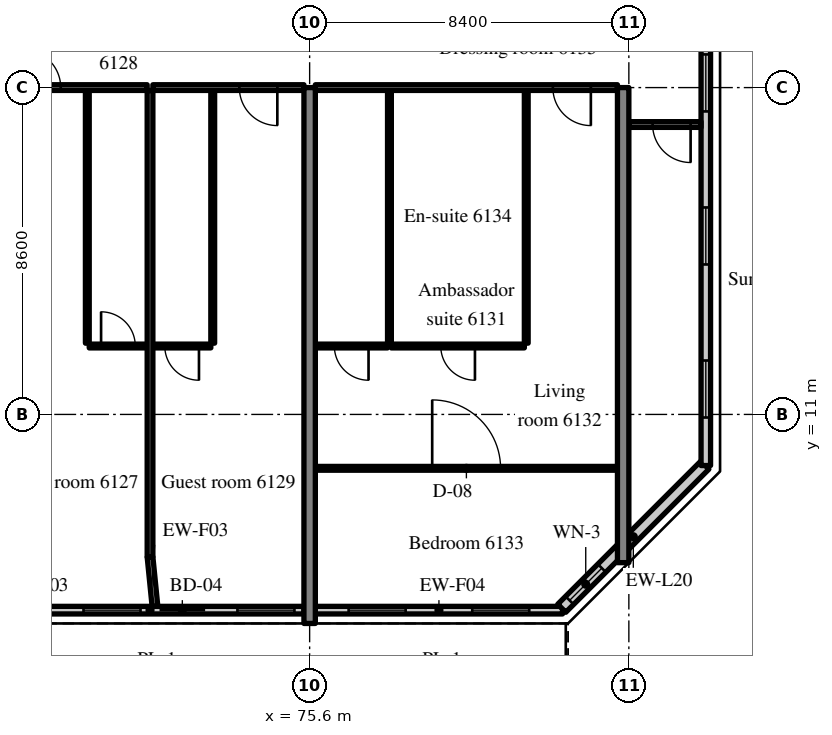
"""IFC4 building model, lengths in metres.
Left out: names, types, materials, properties, quantities, classifications, styles, units other than length and angle.
Written with IfcOpenShell. Run it as: python <this file> out.ifc"""

import sys

from ifc_helpers import new_model, si_unit, direction, frame, frame_2d, origin, place, context, subcontext, project, spatial, rectangle, extrude, source, transform, mapped, element, fill, save


model = new_model("IFC4")
c1 = context("Model", 3, precision=1e-05, world=origin(), true_north=direction((0.0, 1.0)))
c2 = subcontext(c1, "Body", "Model", "MODEL_VIEW")
j1 = project(units=[si_unit("LENGTHUNIT", "METRE"), si_unit("PLANEANGLEUNIT", "RADIAN")], contexts=[c1])
p1 = place(None, origin())
s1 = spatial("IfcSite", under=j1, at=p1, CompositionType="ELEMENT")
p2 = place(p1, origin())
s2 = spatial("IfcBuilding", under=s1, at=p2, CompositionType="ELEMENT")
p3 = place(p2, frame((0.0, 0.0, 253.0)))
s3 = spatial("IfcBuildingStorey", under=s2, at=p3, CompositionType="ELEMENT", Elevation=253.0)
m1 = source(origin(), c2, "Body", "SweptSolid", [
    extrude(rectangle(XDim=14.1, YDim=0.3, at=frame_2d((7.05, 0.0))), origin(), (0.0, 0.0, 1.0), 3.62),
])
p4 = place(p3, frame((75.6, 5.5, 0.0), z_axis=(0.0, 0.0, 1.0), x_axis=(0.0, 1.0, 0.0)))
e1 = element("IfcWall", 1, at=p4, inside=s3, PredefinedType="SHEAR", context=c2, shape_type="MappedRepresentation", body=[
    mapped(m1, transform((0.0, 0.0, 0.0), scale=1.0)),
])
m2 = source(origin(), c2, "Body", "SweptSolid", [
    extrude(rectangle(XDim=12.5, YDim=0.3, at=frame_2d((6.25, 0.0))), origin(), (0.0, 0.0, 1.0), 3.62),
])
p5 = place(p3, frame((83.85, 7.1, 0.0), z_axis=(0.0, 0.0, 1.0), x_axis=(0.0, 1.0, 0.0)))
e2 = element("IfcWall", 2, at=p5, inside=s3, PredefinedType="SHEAR", context=c2, shape_type="MappedRepresentation", body=[
    mapped(m2, transform((0.0, 0.0, 0.0), scale=1.0)),
])
m3 = source(origin(), c2, "Body", "SweptSolid", [
    extrude(rectangle(XDim=8.1, YDim=0.2, at=frame_2d((4.05, 0.0))), origin(), (0.0, 0.0, 1.0), 3.02),
])
p6 = place(p3, frame((67.35, 5.85, 0.0), z_axis=(0.0, 0.0, 1.0), x_axis=(1.0, 0.0, 0.0)))
e3 = element("IfcWall", 3, at=p6, inside=s3, PredefinedType="SOLIDWALL", context=c2, shape_type="MappedRepresentation", body=[
    mapped(m3, transform((0.0, 0.0, 0.0), scale=1.0)),
])
m4 = source(origin(), c2, "Body", "SweptSolid", [
    extrude(rectangle(XDim=1.2, YDim=2.4, at=frame_2d((0.6, 1.2))), frame((0.0, 0.11, 0.0), z_axis=(0.0, -1.0, 0.0), x_axis=(1.0, 0.0, 0.0)), (0.0, 0.0, 1.0), 0.22),
])
p7 = place(p6, frame((0.25, 0.0, 0.0)))
e4 = element("IfcOpeningElement", 4, at=p7, cuts=e3, PredefinedType="OPENING", context=c2, shape_type="MappedRepresentation", body=[
    mapped(m4, transform((0.0, 0.0, 0.0), scale=1.0)),
])
m5 = source(origin(), c2, "Body", "SweptSolid", [
    extrude(rectangle(XDim=1.5, YDim=1.5, at=frame_2d((0.75, 0.75))), frame((0.0, 0.11, 0.0), z_axis=(0.0, -1.0, 0.0), x_axis=(1.0, 0.0, 0.0)), (0.0, 0.0, 1.0), 0.22),
])
p8 = place(p6, frame((2.3, 0.0, 0.9)))
e5 = element("IfcOpeningElement", 5, at=p8, cuts=e3, PredefinedType="OPENING", context=c2, shape_type="MappedRepresentation", body=[
    mapped(m5, transform((0.0, 0.0, 0.0), scale=1.0)),
])
p9 = place(p6, frame((4.3, 0.0, 0.0)))
e6 = element("IfcOpeningElement", 6, at=p9, cuts=e3, PredefinedType="OPENING", context=c2, shape_type="MappedRepresentation", body=[
    mapped(m4, transform((0.0, 0.0, 0.0), scale=1.0)),
])
p10 = place(p6, frame((6.35, 0.0, 0.9)))
e7 = element("IfcOpeningElement", 7, at=p10, cuts=e3, PredefinedType="OPENING", context=c2, shape_type="MappedRepresentation", body=[
    mapped(m5, transform((0.0, 0.0, 0.0), scale=1.0)),
])
m6 = source(origin(), c2, "Body", "SweptSolid", [
    extrude(rectangle(XDim=6.505, YDim=0.2, at=frame_2d((3.252, 0.0))), origin(), (0.0, 0.0, 1.0), 3.02),
])
p11 = place(p3, frame((75.75, 5.85, 0.0), z_axis=(0.0, 0.0, 1.0), x_axis=(1.0, 0.0, 0.0)))
e8 = element("IfcWall", 8, at=p11, inside=s3, PredefinedType="SOLIDWALL", context=c2, shape_type="MappedRepresentation", body=[
    mapped(m6, transform((0.0, 0.0, 0.0), scale=1.0)),
])
p12 = place(p11, frame((0.876, 0.0, 0.9)))
e9 = element("IfcOpeningElement", 9, at=p12, cuts=e8, PredefinedType="OPENING", context=c2, shape_type="MappedRepresentation", body=[
    mapped(m5, transform((0.0, 0.0, 0.0), scale=1.0)),
])
p13 = place(p11, frame((4.129, 0.0, 0.9)))
e10 = element("IfcOpeningElement", 10, at=p13, cuts=e8, PredefinedType="OPENING", context=c2, shape_type="MappedRepresentation", body=[
    mapped(m5, transform((0.0, 0.0, 0.0), scale=1.0)),
])
m7 = source(origin(), c2, "Body", "SweptSolid", [
    extrude(rectangle(XDim=5.326, YDim=0.3, at=frame_2d((2.663, 0.0))), origin(), (0.0, 0.0, 1.0), 3.62),
])
p14 = place(p3, frame((82.234, 5.9, 0.0), z_axis=(0.0, 0.0, 1.0), x_axis=(0.707083859269, 0.707129702361, 0.0)))
e11 = element("IfcWall", 11, at=p14, inside=s3, PredefinedType="SOLIDWALL", context=c2, shape_type="MappedRepresentation", body=[
    mapped(m7, transform((0.0, 0.0, 0.0), scale=1.0)),
])
m8 = source(origin(), c2, "Body", "SweptSolid", [
    extrude(rectangle(XDim=1.2, YDim=1.5, at=frame_2d((0.6, 0.75))), frame((0.0, 0.16, 0.0), z_axis=(0.0, -1.0, 0.0), x_axis=(1.0, 0.0, 0.0)), (0.0, 0.0, 1.0), 0.32),
])
p15 = place(p14, frame((0.292, 0.0, 0.9)))
e12 = element("IfcOpeningElement", 12, at=p15, cuts=e11, PredefinedType="OPENING", context=c2, shape_type="MappedRepresentation", body=[
    mapped(m8, transform((0.0, 0.0, 0.0), scale=1.0)),
])
m9 = source(origin(), c2, "Body", "SweptSolid", [
    extrude(rectangle(XDim=28.189, YDim=0.25, at=frame_2d((14.095, 0.0))), origin(), (0.0, 0.0, 1.0), 3.62),
])
p16 = place(p3, frame((86.025, 9.655, 0.0), z_axis=(0.0, 0.0, 1.0), x_axis=(0.0, 1.0, 0.0)))
e13 = element("IfcWall", 13, at=p16, inside=s3, PredefinedType="SOLIDWALL", context=c2, shape_type="MappedRepresentation", body=[
    mapped(m9, transform((0.0, 0.0, 0.0), scale=1.0)),
])
m10 = source(origin(), c2, "Body", "SweptSolid", [
    extrude(rectangle(XDim=1.5, YDim=1.5, at=frame_2d((0.75, 0.75))), frame((0.0, 0.135, 0.0), z_axis=(0.0, -1.0, 0.0), x_axis=(1.0, 0.0, 0.0)), (0.0, 0.0, 1.0), 0.27),
])
p17 = place(p16, frame((1.263, 0.0, 0.9)))
e14 = element("IfcOpeningElement", 14, at=p17, cuts=e13, PredefinedType="OPENING", context=c2, shape_type="MappedRepresentation", body=[
    mapped(m10, transform((0.0, 0.0, 0.0), scale=1.0)),
])
p18 = place(p16, frame((5.291, 0.0, 0.9)))
e15 = element("IfcOpeningElement", 15, at=p18, cuts=e13, PredefinedType="OPENING", context=c2, shape_type="MappedRepresentation", body=[
    mapped(m10, transform((0.0, 0.0, 0.0), scale=1.0)),
])
p19 = place(p16, frame((9.318, 0.0, 0.9)))
e16 = element("IfcOpeningElement", 16, at=p19, cuts=e13, PredefinedType="OPENING", context=c2, shape_type="MappedRepresentation", body=[
    mapped(m10, transform((0.0, 0.0, 0.0), scale=1.0)),
])
p20 = place(p16, frame((13.345, 0.0, 0.9)))
e17 = element("IfcOpeningElement", 17, at=p20, cuts=e13, PredefinedType="OPENING", context=c2, shape_type="MappedRepresentation", body=[
    mapped(m10, transform((0.0, 0.0, 0.0), scale=1.0)),
])
p21 = place(p16, frame((17.372, 0.0, 0.9)))
e18 = element("IfcOpeningElement", 18, at=p21, cuts=e13, PredefinedType="OPENING", context=c2, shape_type="MappedRepresentation", body=[
    mapped(m10, transform((0.0, 0.0, 0.0), scale=1.0)),
])
p22 = place(p16, frame((21.399, 0.0, 0.9)))
e19 = element("IfcOpeningElement", 19, at=p22, cuts=e13, PredefinedType="OPENING", context=c2, shape_type="MappedRepresentation", body=[
    mapped(m10, transform((0.0, 0.0, 0.0), scale=1.0)),
])
p23 = place(p16, frame((25.426, 0.0, 0.9)))
e20 = element("IfcOpeningElement", 20, at=p23, cuts=e13, PredefinedType="OPENING", context=c2, shape_type="MappedRepresentation", body=[
    mapped(m10, transform((0.0, 0.0, 0.0), scale=1.0)),
])
m11 = source(origin(), c2, "Body", "SweptSolid", [
    extrude(rectangle(XDim=6.65, YDim=0.1, at=frame_2d((3.325, 0.0))), origin(), (0.0, 0.0, 1.0), 3.62),
])
p24 = place(p3, frame((69.75, 12.875, 0.0), z_axis=(0.0, 0.0, 1.0), x_axis=(0.0, 1.0, 0.0)))
e21 = element("IfcWall", 21, at=p24, inside=s3, PredefinedType="PARTITIONING", context=c2, shape_type="MappedRepresentation", body=[
    mapped(m11, transform((0.0, 0.0, 0.0), scale=1.0)),
])
m12 = source(origin(), c2, "Body", "SweptSolid", [
    extrude(rectangle(XDim=1.525, YDim=0.1, at=frame_2d((0.762, 0.0))), origin(), (0.0, 0.0, 1.0), 3.62),
])
p25 = place(p3, frame((69.8, 12.8, 0.0), z_axis=(0.0, 0.0, 1.0), x_axis=(1.0, 0.0, 0.0)))
e22 = element("IfcWall", 22, at=p25, inside=s3, PredefinedType="PARTITIONING", context=c2, shape_type="MappedRepresentation", body=[
    mapped(m12, transform((0.0, 0.0, 0.0), scale=1.0)),
])
m13 = source(origin(), c2, "Body", "SweptSolid", [
    extrude(rectangle(XDim=0.9, YDim=2.1, at=frame_2d((0.45, 1.05))), frame((0.0, 0.06, 0.0), z_axis=(0.0, -1.0, 0.0), x_axis=(1.0, 0.0, 0.0)), (0.0, 0.0, 1.0), 0.12),
])
p26 = place(p25, frame((0.312, 0.0, 0.0)))
e23 = element("IfcOpeningElement", 23, at=p26, cuts=e22, PredefinedType="OPENING", context=c2, shape_type="MappedRepresentation", body=[
    mapped(m13, transform((0.0, 0.0, 0.0), scale=1.0)),
])
m14 = source(origin(), c2, "Body", "SweptSolid", [
    extrude(rectangle(XDim=3.975, YDim=0.15, at=frame_2d((1.987, 0.0))), origin(), (0.0, 0.0, 1.0), 2.92),
])
p27 = place(p3, frame((67.35, 19.6, 0.0), z_axis=(0.0, 0.0, 1.0), x_axis=(1.0, 0.0, 0.0)))
e24 = element("IfcWall", 24, at=p27, inside=s3, PredefinedType="PARTITIONING", context=c2, shape_type="MappedRepresentation", body=[
    mapped(m14, transform((0.0, 0.0, 0.0), scale=1.0)),
])
m15 = source(origin(), c2, "Body", "SweptSolid", [
    extrude(rectangle(XDim=1.0, YDim=2.1, at=frame_2d((0.5, 1.05))), frame((0.0, 0.085, 0.0), z_axis=(0.0, -1.0, 0.0), x_axis=(1.0, 0.0, 0.0)), (0.0, 0.0, 1.0), 0.17),
])
p28 = place(p27, frame((0.7, 0.0, 0.0)))
e25 = element("IfcOpeningElement", 25, at=p28, cuts=e24, PredefinedType="OPENING", context=c2, shape_type="MappedRepresentation", body=[
    mapped(m15, transform((0.0, 0.0, 0.0), scale=1.0)),
])
p29 = place(p3, frame((73.05, 12.875, 0.0), z_axis=(0.0, 0.0, 1.0), x_axis=(0.0, 1.0, 0.0)))
e26 = element("IfcWall", 26, at=p29, inside=s3, PredefinedType="PARTITIONING", context=c2, shape_type="MappedRepresentation", body=[
    mapped(m11, transform((0.0, 0.0, 0.0), scale=1.0)),
])
p30 = place(p3, frame((71.475, 12.8, 0.0), z_axis=(0.0, 0.0, 1.0), x_axis=(1.0, 0.0, 0.0)))
e27 = element("IfcWall", 27, at=p30, inside=s3, PredefinedType="PARTITIONING", context=c2, shape_type="MappedRepresentation", body=[
    mapped(m12, transform((0.0, 0.0, 0.0), scale=1.0)),
])
p31 = place(p30, frame((0.313, 0.0, 0.0)))
e28 = element("IfcOpeningElement", 28, at=p31, cuts=e27, PredefinedType="OPENING", context=c2, shape_type="MappedRepresentation", body=[
    mapped(m13, transform((0.0, 0.0, 0.0), scale=1.0)),
])
p32 = place(p3, frame((71.475, 19.6, 0.0), z_axis=(0.0, 0.0, 1.0), x_axis=(1.0, 0.0, 0.0)))
e29 = element("IfcWall", 29, at=p32, inside=s3, PredefinedType="PARTITIONING", context=c2, shape_type="MappedRepresentation", body=[
    mapped(m14, transform((0.0, 0.0, 0.0), scale=1.0)),
])
p33 = place(p32, frame((2.275, 0.0, 0.0)))
e30 = element("IfcOpeningElement", 30, at=p33, cuts=e29, PredefinedType="OPENING", context=c2, shape_type="MappedRepresentation", body=[
    mapped(m15, transform((0.0, 0.0, 0.0), scale=1.0)),
])
m16 = source(origin(), c2, "Body", "SweptSolid", [
    extrude(rectangle(XDim=12.275, YDim=0.15, at=frame_2d((6.137, 0.0))), origin(), (0.0, 0.0, 1.0), 3.62),
])
p34 = place(p3, frame((71.4, 7.25, 0.0), z_axis=(0.0, 0.0, 1.0), x_axis=(0.0, 1.0, 0.0)))
e31 = element("IfcWall", 31, at=p34, inside=s3, PredefinedType="PARTITIONING", context=c2, shape_type="MappedRepresentation", body=[
    mapped(m16, transform((0.0, 0.0, 0.0), scale=1.0)),
])
for number, where, z_axis, x_axis in (
    (32, (81.3, 12.875, 0.0), (0.0, 0.0, 1.0), (0.0, 1.0, 0.0)),
    (33, (77.7, 12.875, 0.0), (0.0, 0.0, 1.0), (0.0, 1.0, 0.0)),
):
    element("IfcWall", number, at=place(p3, frame(where, z_axis=z_axis, x_axis=x_axis)), inside=s3, PredefinedType="PARTITIONING", context=c2, shape_type="MappedRepresentation", body=[
        mapped(m11, transform((0.0, 0.0, 0.0), scale=1.0)),
    ])
m17 = source(origin(), c2, "Body", "SweptSolid", [
    extrude(rectangle(XDim=3.5, YDim=0.1, at=frame_2d((1.75, 0.0))), origin(), (0.0, 0.0, 1.0), 3.62),
])
p35 = place(p3, frame((77.75, 12.8, 0.0), z_axis=(0.0, 0.0, 1.0), x_axis=(1.0, 0.0, 0.0)))
e34 = element("IfcWall", 34, at=p35, inside=s3, PredefinedType="PARTITIONING", context=c2, shape_type="MappedRepresentation", body=[
    mapped(m17, transform((0.0, 0.0, 0.0), scale=1.0)),
])
p36 = place(p35, frame((1.3, 0.0, 0.0)))
e35 = element("IfcOpeningElement", 35, at=p36, cuts=e34, PredefinedType="OPENING", context=c2, shape_type="MappedRepresentation", body=[
    mapped(m13, transform((0.0, 0.0, 0.0), scale=1.0)),
])
m18 = source(origin(), c2, "Body", "SweptSolid", [
    extrude(rectangle(XDim=1.9, YDim=0.1, at=frame_2d((0.95, 0.0))), origin(), (0.0, 0.0, 1.0), 3.62),
])
p37 = place(p3, frame((75.75, 12.8, 0.0), z_axis=(0.0, 0.0, 1.0), x_axis=(1.0, 0.0, 0.0)))
e36 = element("IfcWall", 36, at=p37, inside=s3, PredefinedType="PARTITIONING", context=c2, shape_type="MappedRepresentation", body=[
    mapped(m18, transform((0.0, 0.0, 0.0), scale=1.0)),
])
p38 = place(p37, frame((0.5, 0.0, 0.0)))
e37 = element("IfcOpeningElement", 37, at=p38, cuts=e36, PredefinedType="OPENING", context=c2, shape_type="MappedRepresentation", body=[
    mapped(m13, transform((0.0, 0.0, 0.0), scale=1.0)),
])
m19 = source(origin(), c2, "Body", "SweptSolid", [
    extrude(rectangle(XDim=7.95, YDim=0.1, at=frame_2d((3.975, 0.0))), origin(), (0.0, 0.0, 1.0), 3.62),
])
p39 = place(p3, frame((75.75, 9.582, 0.0), z_axis=(0.0, 0.0, 1.0), x_axis=(1.0, 0.0, 0.0)))
e38 = element("IfcWall", 38, at=p39, inside=s3, PredefinedType="PARTITIONING", context=c2, shape_type="MappedRepresentation", body=[
    mapped(m19, transform((0.0, 0.0, 0.0), scale=1.0)),
])
m20 = source(origin(), c2, "Body", "SweptSolid", [
    extrude(rectangle(XDim=1.8, YDim=2.1, at=frame_2d((0.9, 1.05))), frame((0.0, 0.06, 0.0), z_axis=(0.0, -1.0, 0.0), x_axis=(1.0, 0.0, 0.0)), (0.0, 0.0, 1.0), 0.12),
])
p40 = place(p39, frame((3.075, 0.0, 0.0)))
e39 = element("IfcOpeningElement", 39, at=p40, cuts=e38, PredefinedType="OPENING", context=c2, shape_type="MappedRepresentation", body=[
    mapped(m20, transform((0.0, 0.0, 0.0), scale=1.0)),
])
m21 = source(origin(), c2, "Body", "SweptSolid", [
    extrude(rectangle(XDim=7.95, YDim=0.15, at=frame_2d((3.975, 0.0))), origin(), (0.0, 0.0, 1.0), 2.92),
])
p41 = place(p3, frame((75.75, 19.6, 0.0), z_axis=(0.0, 0.0, 1.0), x_axis=(1.0, 0.0, 0.0)))
e40 = element("IfcWall", 40, at=p41, inside=s3, PredefinedType="PARTITIONING", context=c2, shape_type="MappedRepresentation", body=[
    mapped(m21, transform((0.0, 0.0, 0.0), scale=1.0)),
])
p42 = place(p41, frame((6.25, 0.0, 0.0)))
e41 = element("IfcOpeningElement", 41, at=p42, cuts=e40, PredefinedType="OPENING", context=c2, shape_type="MappedRepresentation", body=[
    mapped(m15, transform((0.0, 0.0, 0.0), scale=1.0)),
])
m22 = source(origin(), c2, "Body", "SweptSolid", [
    extrude(rectangle(XDim=1.9, YDim=0.15, at=frame_2d((0.95, 0.0))), origin(), (0.0, 0.0, 1.0), 2.92),
])
p43 = place(p3, frame((84.0, 18.628, 0.0), z_axis=(0.0, 0.0, 1.0), x_axis=(1.0, 0.0, 0.0)))
e42 = element("IfcWall", 42, at=p43, inside=s3, PredefinedType="PARTITIONING", context=c2, shape_type="MappedRepresentation", body=[
    mapped(m22, transform((0.0, 0.0, 0.0), scale=1.0)),
])
p44 = place(p43, frame((0.625, 0.0, 0.0)))
e43 = element("IfcOpeningElement", 43, at=p44, cuts=e42, PredefinedType="OPENING", context=c2, shape_type="MappedRepresentation", body=[
    mapped(m15, transform((0.0, 0.0, 0.0), scale=1.0)),
])
m23 = source(origin(), c2, "Body", "SweptSolid", [
    extrude(rectangle(XDim=1.307, YDim=0.15, at=frame_2d((0.653, 0.0))), origin(), (0.0, 0.0, 1.0), 3.62),
])
p45 = place(p3, frame((71.53, 5.95, 0.0), z_axis=(0.0, 0.0, 1.0), x_axis=(-0.099596223396, 0.99502793543, 0.0)))
e44 = element("IfcWall", 44, at=p45, inside=s3, PredefinedType="PARTITIONING", context=c2, shape_type="MappedRepresentation", body=[
    mapped(m23, transform((0.0, 0.0, 0.0), scale=1.0)),
])
m24 = source(origin(), c2, "Body", "SweptSolid", [
    extrude(rectangle(XDim=1.5, YDim=1.5, at=frame_2d((0.75, 0.75))), frame((0.0, 0.03, 0.0), z_axis=(0.0, -1.0, 0.0), x_axis=(1.0, 0.0, 0.0)), (0.0, 0.0, 1.0), 0.06),
])
p46 = place(p8, origin())
e45 = element("IfcWindow", 45, at=p46, inside=s3, PartitioningType="SINGLE_PANEL", PredefinedType="WINDOW", context=c2, shape_type="MappedRepresentation", body=[
    mapped(m24, transform((0.0, 0.0, 0.0), scale=1.0)),
])
fill(e5, e45)
m25 = source(origin(), c2, "Body", "SweptSolid", [
    extrude(rectangle(XDim=1.2, YDim=2.4, at=frame_2d((0.6, 1.2))), frame((0.0, 0.025, 0.0), z_axis=(0.0, -1.0, 0.0), x_axis=(1.0, 0.0, 0.0)), (0.0, 0.0, 1.0), 0.05),
])
p47 = place(p9, origin())
e46 = element("IfcDoor", 46, at=p47, inside=s3, OperationType="SLIDING_TO_RIGHT", PredefinedType="DOOR", context=c2, shape_type="MappedRepresentation", body=[
    mapped(m25, transform((0.0, 0.0, 0.0), scale=1.0)),
])
fill(e6, e46)
p48 = place(p10, origin())
e47 = element("IfcWindow", 47, at=p48, inside=s3, PartitioningType="SINGLE_PANEL", PredefinedType="WINDOW", context=c2, shape_type="MappedRepresentation", body=[
    mapped(m24, transform((0.0, 0.0, 0.0), scale=1.0)),
])
fill(e7, e47)
p49 = place(p12, origin())
e48 = element("IfcWindow", 48, at=p49, inside=s3, PartitioningType="SINGLE_PANEL", PredefinedType="WINDOW", context=c2, shape_type="MappedRepresentation", body=[
    mapped(m24, transform((0.0, 0.0, 0.0), scale=1.0)),
])
fill(e9, e48)
p50 = place(p13, origin())
e49 = element("IfcWindow", 49, at=p50, inside=s3, PartitioningType="SINGLE_PANEL", PredefinedType="WINDOW", context=c2, shape_type="MappedRepresentation", body=[
    mapped(m24, transform((0.0, 0.0, 0.0), scale=1.0)),
])
fill(e10, e49)
m26 = source(origin(), c2, "Body", "SweptSolid", [
    extrude(rectangle(XDim=1.2, YDim=1.5, at=frame_2d((0.6, 0.75))), frame((0.0, 0.03, 0.0), z_axis=(0.0, -1.0, 0.0), x_axis=(1.0, 0.0, 0.0)), (0.0, 0.0, 1.0), 0.06),
])
p51 = place(p15, origin())
e50 = element("IfcWindow", 50, at=p51, inside=s3, PartitioningType="SINGLE_PANEL", PredefinedType="WINDOW", context=c2, shape_type="MappedRepresentation", body=[
    mapped(m26, transform((0.0, 0.0, 0.0), scale=1.0)),
])
fill(e12, e50)
p52 = place(p17, origin())
e51 = element("IfcWindow", 51, at=p52, inside=s3, PartitioningType="SINGLE_PANEL", PredefinedType="WINDOW", context=c2, shape_type="MappedRepresentation", body=[
    mapped(m24, transform((0.0, 0.0, 0.0), scale=1.0)),
])
fill(e14, e51)
p53 = place(p18, origin())
e52 = element("IfcWindow", 52, at=p53, inside=s3, PartitioningType="SINGLE_PANEL", PredefinedType="WINDOW", context=c2, shape_type="MappedRepresentation", body=[
    mapped(m24, transform((0.0, 0.0, 0.0), scale=1.0)),
])
fill(e15, e52)
p54 = place(p19, origin())
e53 = element("IfcWindow", 53, at=p54, inside=s3, PartitioningType="SINGLE_PANEL", PredefinedType="WINDOW", context=c2, shape_type="MappedRepresentation", body=[
    mapped(m24, transform((0.0, 0.0, 0.0), scale=1.0)),
])
fill(e16, e53)
m27 = source(origin(), c2, "Body", "SweptSolid", [
    extrude(rectangle(XDim=0.9, YDim=2.1, at=frame_2d((0.45, 1.05))), frame((0.0, 0.025, 0.0), z_axis=(0.0, -1.0, 0.0), x_axis=(1.0, 0.0, 0.0)), (0.0, 0.0, 1.0), 0.05),
])
p55 = place(p26, origin())
e54 = element("IfcDoor", 54, at=p55, inside=s3, OperationType="SINGLE_SWING_LEFT", PredefinedType="DOOR", context=c2, shape_type="MappedRepresentation", body=[
    mapped(m27, transform((0.0, 0.0, 0.0), scale=1.0)),
])
fill(e23, e54)
m28 = source(origin(), c2, "Body", "SweptSolid", [
    extrude(rectangle(XDim=1.0, YDim=2.1, at=frame_2d((0.5, 1.05))), frame((0.0, 0.025, 0.0), z_axis=(0.0, -1.0, 0.0), x_axis=(1.0, 0.0, 0.0)), (0.0, 0.0, 1.0), 0.05),
])
p56 = place(p28, origin())
e55 = element("IfcDoor", 55, at=p56, inside=s3, OperationType="SINGLE_SWING_LEFT", PredefinedType="DOOR", context=c2, shape_type="MappedRepresentation", body=[
    mapped(m28, transform((0.0, 0.0, 0.0), scale=1.0)),
])
fill(e25, e55)
p57 = place(p31, origin())
e56 = element("IfcDoor", 56, at=p57, inside=s3, OperationType="SINGLE_SWING_RIGHT", PredefinedType="DOOR", context=c2, shape_type="MappedRepresentation", body=[
    mapped(m27, transform((0.0, 0.0, 0.0), scale=1.0)),
])
fill(e28, e56)
p58 = place(p33, origin())
e57 = element("IfcDoor", 57, at=p58, inside=s3, OperationType="SINGLE_SWING_RIGHT", PredefinedType="DOOR", context=c2, shape_type="MappedRepresentation", body=[
    mapped(m28, transform((0.0, 0.0, 0.0), scale=1.0)),
])
fill(e30, e57)
p59 = place(p36, origin())
e58 = element("IfcDoor", 58, at=p59, inside=s3, OperationType="SINGLE_SWING_RIGHT", PredefinedType="DOOR", context=c2, shape_type="MappedRepresentation", body=[
    mapped(m27, transform((0.0, 0.0, 0.0), scale=1.0)),
])
fill(e35, e58)
p60 = place(p38, origin())
e59 = element("IfcDoor", 59, at=p60, inside=s3, OperationType="SINGLE_SWING_RIGHT", PredefinedType="DOOR", context=c2, shape_type="MappedRepresentation", body=[
    mapped(m27, transform((0.0, 0.0, 0.0), scale=1.0)),
])
fill(e37, e59)
m29 = source(origin(), c2, "Body", "SweptSolid", [
    extrude(rectangle(XDim=1.8, YDim=2.1, at=frame_2d((0.9, 1.05))), frame((0.0, 0.025, 0.0), z_axis=(0.0, -1.0, 0.0), x_axis=(1.0, 0.0, 0.0)), (0.0, 0.0, 1.0), 0.05),
])
p61 = place(p40, origin())
e60 = element("IfcDoor", 60, at=p61, inside=s3, OperationType="DOUBLE_DOOR_SINGLE_SWING", PredefinedType="DOOR", context=c2, shape_type="MappedRepresentation", body=[
    mapped(m29, transform((0.0, 0.0, 0.0), scale=1.0)),
])
fill(e39, e60)
p62 = place(p42, origin())
e61 = element("IfcDoor", 61, at=p62, inside=s3, OperationType="SINGLE_SWING_RIGHT", PredefinedType="DOOR", context=c2, shape_type="MappedRepresentation", body=[
    mapped(m28, transform((0.0, 0.0, 0.0), scale=1.0)),
])
fill(e41, e61)
p63 = place(p44, origin())
e62 = element("IfcDoor", 62, at=p63, inside=s3, OperationType="SINGLE_SWING_RIGHT", PredefinedType="DOOR", context=c2, shape_type="MappedRepresentation", body=[
    mapped(m28, transform((0.0, 0.0, 0.0), scale=1.0)),
])
fill(e43, e62)
save(model, sys.argv[1])
